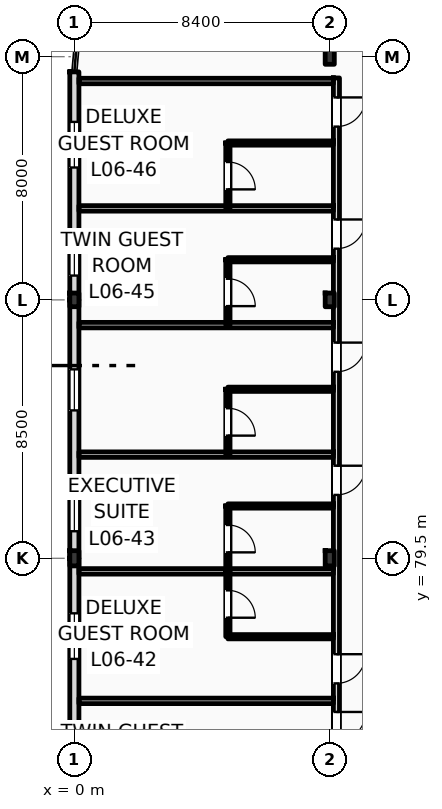
"""IFC4 building model, lengths in metres.
Left out: names, types, materials, properties, quantities, classifications, styles, units other than length and angle.
Written with IfcOpenShell. Run it as: python <this file> out.ifc"""

import sys

from ifc_helpers import new_model, si_unit, direction, frame, frame_2d, origin, origin_2d, place, context, subcontext, project, spatial, rectangle, i_section, extrude, element, fill, save


model = new_model("IFC4")
c1 = context("Model", 3, precision=1e-05, world=origin(), true_north=direction((0.0, 1.0)))
c2 = subcontext(c1, "Body", "Model", "MODEL_VIEW")
j1 = project(units=[si_unit("LENGTHUNIT", "METRE"), si_unit("PLANEANGLEUNIT", "RADIAN")], contexts=[c1])
p1 = place(None, origin())
s1 = spatial("IfcSite", under=j1, at=p1, CompositionType="ELEMENT")
p2 = place(p1, origin())
s2 = spatial("IfcBuilding", under=s1, at=p2, CompositionType="ELEMENT")
p3 = place(p2, frame((0.0, 0.0, 28.2)))
s3 = spatial("IfcBuildingStorey", under=s2, at=p3, CompositionType="ELEMENT", Elevation=28.2)
p4 = place(p3, frame((0.0, 79.5, 0.0), z_axis=(0.0, 0.0, 1.0), x_axis=(1.0, 0.0, 0.0)))
e1 = element("IfcColumn", 1, at=p4, inside=s3, PredefinedType="COLUMN", context=c2, shape_type="SweptSolid", body=[
    extrude(i_section(OverallWidth=0.3, OverallDepth=0.5, WebThickness=0.014, FlangeThickness=0.028, FilletRadius=0.027, at=origin_2d()), origin(), (0.0, 0.0, 1.0), 3.6),
])
p5 = place(p3, frame((0.0, 88.0, 0.0), z_axis=(0.0, 0.0, 1.0), x_axis=(1.0, 0.0, 0.0)))
e2 = element("IfcColumn", 2, at=p5, inside=s3, PredefinedType="COLUMN", context=c2, shape_type="SweptSolid", body=[
    extrude(i_section(OverallWidth=0.3, OverallDepth=0.45, WebThickness=0.014, FlangeThickness=0.026, FilletRadius=0.027, at=origin_2d()), origin(), (0.0, 0.0, 1.0), 3.6),
])
p6 = place(p3, frame((8.4, 79.5, 0.0), z_axis=(0.0, 0.0, 1.0), x_axis=(1.0, 0.0, 0.0)))
e3 = element("IfcColumn", 3, at=p6, inside=s3, PredefinedType="COLUMN", context=c2, shape_type="SweptSolid", body=[
    extrude(i_section(OverallWidth=0.3, OverallDepth=0.5, WebThickness=0.014, FlangeThickness=0.028, FilletRadius=0.027, at=origin_2d()), origin(), (0.0, 0.0, 1.0), 3.6),
])
p7 = place(p3, frame((8.4, 88.0, 0.0), z_axis=(0.0, 0.0, 1.0), x_axis=(1.0, 0.0, 0.0)))
e4 = element("IfcColumn", 4, at=p7, inside=s3, PredefinedType="COLUMN", context=c2, shape_type="SweptSolid", body=[
    extrude(i_section(OverallWidth=0.3, OverallDepth=0.45, WebThickness=0.014, FlangeThickness=0.026, FilletRadius=0.027, at=origin_2d()), origin(), (0.0, 0.0, 1.0), 3.6),
])
p8 = place(p3, frame((8.4, 96.0, 0.0), z_axis=(0.0, 0.0, 1.0), x_axis=(1.0, 0.0, 0.0)))
e5 = element("IfcColumn", 5, at=p8, inside=s3, PredefinedType="COLUMN", context=c2, shape_type="SweptSolid", body=[
    extrude(i_section(OverallWidth=0.3, OverallDepth=0.5, WebThickness=0.014, FlangeThickness=0.028, FilletRadius=0.027, at=origin_2d()), origin(), (0.0, 0.0, 1.0), 3.6),
])
p9 = place(p3, frame((0.0, 71.0, 0.0), z_axis=(0.0, 0.0, 1.0), x_axis=(0.0, 1.0, 0.0)))
e6 = element("IfcWall", 6, at=p9, inside=s3, PredefinedType="STANDARD", context=c2, shape_type="SweptSolid", body=[
    extrude(rectangle(XDim=8.5, YDim=0.3, at=frame_2d((4.25, 0.0))), origin(), (0.0, 0.0, 1.0), 2.99),
])
p10 = place(p9, frame((1.14, 0.0, 0.9)))
e7 = element("IfcOpeningElement", 7, at=p10, cuts=e6, PredefinedType="OPENING", context=c2, shape_type="SweptSolid", body=[
    extrude(rectangle(XDim=1.5, YDim=1.91, at=frame_2d((0.75, 0.955))), frame((0.0, 0.16, 0.0), z_axis=(0.0, -1.0, 0.0), x_axis=(1.0, 0.0, 0.0)), (0.0, 0.0, 1.0), 0.32),
])
p11 = place(p9, frame((5.19, 0.0, 0.9)))
e8 = element("IfcOpeningElement", 8, at=p11, cuts=e6, PredefinedType="OPENING", context=c2, shape_type="SweptSolid", body=[
    extrude(rectangle(XDim=1.5, YDim=1.91, at=frame_2d((0.75, 0.955))), frame((0.0, 0.16, 0.0), z_axis=(0.0, -1.0, 0.0), x_axis=(1.0, 0.0, 0.0)), (0.0, 0.0, 1.0), 0.32),
])
p12 = place(p3, frame((0.0, 79.5, 0.0), z_axis=(0.0, 0.0, 1.0), x_axis=(0.0, 1.0, 0.0)))
e9 = element("IfcWall", 9, at=p12, inside=s3, PredefinedType="STANDARD", context=c2, shape_type="SweptSolid", body=[
    extrude(rectangle(XDim=8.5, YDim=0.3, at=frame_2d((4.25, 0.0))), origin(), (0.0, 0.0, 1.0), 2.99),
])
p13 = place(p12, frame((0.89, 0.0, 0.9)))
e10 = element("IfcOpeningElement", 10, at=p13, cuts=e9, PredefinedType="OPENING", context=c2, shape_type="SweptSolid", body=[
    extrude(rectangle(XDim=1.2, YDim=1.8, at=frame_2d((0.6, 0.9))), frame((0.0, 0.16, 0.0), z_axis=(0.0, -1.0, 0.0), x_axis=(1.0, 0.0, 0.0)), (0.0, 0.0, 1.0), 0.32),
])
p14 = place(p12, frame((4.865, 0.0, 0.9)))
e11 = element("IfcOpeningElement", 11, at=p14, cuts=e9, PredefinedType="OPENING", context=c2, shape_type="SweptSolid", body=[
    extrude(rectangle(XDim=1.35, YDim=1.85, at=frame_2d((0.675, 0.925))), frame((0.0, 0.16, 0.0), z_axis=(0.0, -1.0, 0.0), x_axis=(1.0, 0.0, 0.0)), (0.0, 0.0, 1.0), 0.32),
])
p15 = place(p3, frame((0.0, 88.0, 0.0), z_axis=(0.0, 0.0, 1.0), x_axis=(0.0, 1.0, 0.0)))
e12 = element("IfcWall", 12, at=p15, inside=s3, PredefinedType="STANDARD", context=c2, shape_type="SweptSolid", body=[
    extrude(rectangle(XDim=7.5, YDim=0.3, at=frame_2d((3.75, 0.0))), origin(), (0.0, 0.0, 1.0), 3.36),
])
p16 = place(p15, frame((0.8, 0.0, 0.9)))
e13 = element("IfcOpeningElement", 13, at=p16, cuts=e12, PredefinedType="OPENING", context=c2, shape_type="SweptSolid", body=[
    extrude(rectangle(XDim=1.5, YDim=1.9, at=frame_2d((0.75, 0.95))), frame((0.0, 0.16, 0.0), z_axis=(0.0, -1.0, 0.0), x_axis=(1.0, 0.0, 0.0)), (0.0, 0.0, 1.0), 0.32),
])
p17 = place(p15, frame((4.355, 0.0, 0.9)))
e14 = element("IfcOpeningElement", 14, at=p17, cuts=e12, PredefinedType="OPENING", context=c2, shape_type="SweptSolid", body=[
    extrude(rectangle(XDim=1.5, YDim=1.95, at=frame_2d((0.75, 0.975))), frame((0.0, 0.16, 0.0), z_axis=(0.0, -1.0, 0.0), x_axis=(1.0, 0.0, 0.0)), (0.0, 0.0, 1.0), 0.32),
])
p18 = place(p3, frame((8.62, 62.64, 0.0), z_axis=(0.0, 0.0, 1.0), x_axis=(0.0, 1.0, 0.0)))
e15 = element("IfcWall", 15, at=p18, inside=s3, PredefinedType="PARTITIONING", context=c2, shape_type="SweptSolid", body=[
    extrude(rectangle(XDim=32.66, YDim=0.2, at=frame_2d((16.33, 0.0))), origin(), (0.0, 0.0, 1.0), 2.99),
])
p19 = place(p18, frame((2.71, 0.0, 0.0)))
e16 = element("IfcOpeningElement", 16, at=p19, cuts=e15, PredefinedType="OPENING", context=c2, shape_type="SweptSolid", body=[
    extrude(rectangle(XDim=0.96, YDim=2.2, at=frame_2d((0.48, 1.1))), frame((0.0, 0.11, 0.0), z_axis=(0.0, -1.0, 0.0), x_axis=(1.0, 0.0, 0.0)), (0.0, 0.0, 1.0), 0.22),
])
p20 = place(p18, frame((4.645, 0.0, 0.0)))
e17 = element("IfcOpeningElement", 17, at=p20, cuts=e15, PredefinedType="OPENING", context=c2, shape_type="SweptSolid", body=[
    extrude(rectangle(XDim=0.96, YDim=2.2, at=frame_2d((0.48, 1.1))), frame((0.0, 0.11, 0.0), z_axis=(0.0, -1.0, 0.0), x_axis=(1.0, 0.0, 0.0)), (0.0, 0.0, 1.0), 0.22),
])
p21 = place(p18, frame((10.845, 0.0, 0.0)))
e18 = element("IfcOpeningElement", 18, at=p21, cuts=e15, PredefinedType="OPENING", context=c2, shape_type="SweptSolid", body=[
    extrude(rectangle(XDim=0.96, YDim=2.2, at=frame_2d((0.48, 1.1))), frame((0.0, 0.11, 0.0), z_axis=(0.0, -1.0, 0.0), x_axis=(1.0, 0.0, 0.0)), (0.0, 0.0, 1.0), 0.22),
])
p22 = place(p18, frame((12.745, 0.0, 0.0)))
e19 = element("IfcOpeningElement", 19, at=p22, cuts=e15, PredefinedType="OPENING", context=c2, shape_type="SweptSolid", body=[
    extrude(rectangle(XDim=0.96, YDim=2.2, at=frame_2d((0.48, 1.1))), frame((0.0, 0.11, 0.0), z_axis=(0.0, -1.0, 0.0), x_axis=(1.0, 0.0, 0.0)), (0.0, 0.0, 1.0), 0.22),
])
p23 = place(p18, frame((18.945, 0.0, 0.0)))
e20 = element("IfcOpeningElement", 20, at=p23, cuts=e15, PredefinedType="OPENING", context=c2, shape_type="SweptSolid", body=[
    extrude(rectangle(XDim=0.96, YDim=2.2, at=frame_2d((0.48, 1.1))), frame((0.0, 0.11, 0.0), z_axis=(0.0, -1.0, 0.0), x_axis=(1.0, 0.0, 0.0)), (0.0, 0.0, 1.0), 0.22),
])
p24 = place(p18, frame((22.995, 0.0, 0.0)))
e21 = element("IfcOpeningElement", 21, at=p24, cuts=e15, PredefinedType="OPENING", context=c2, shape_type="SweptSolid", body=[
    extrude(rectangle(XDim=0.96, YDim=2.2, at=frame_2d((0.48, 1.1))), frame((0.0, 0.11, 0.0), z_axis=(0.0, -1.0, 0.0), x_axis=(1.0, 0.0, 0.0)), (0.0, 0.0, 1.0), 0.22),
])
p25 = place(p18, frame((27.045, 0.0, 0.0)))
e22 = element("IfcOpeningElement", 22, at=p25, cuts=e15, PredefinedType="OPENING", context=c2, shape_type="SweptSolid", body=[
    extrude(rectangle(XDim=0.96, YDim=2.2, at=frame_2d((0.48, 1.1))), frame((0.0, 0.11, 0.0), z_axis=(0.0, -1.0, 0.0), x_axis=(1.0, 0.0, 0.0)), (0.0, 0.0, 1.0), 0.22),
])
p26 = place(p18, frame((31.06, 0.0, 0.0)))
e23 = element("IfcOpeningElement", 23, at=p26, cuts=e15, PredefinedType="OPENING", context=c2, shape_type="SweptSolid", body=[
    extrude(rectangle(XDim=0.96, YDim=2.2, at=frame_2d((0.48, 1.1))), frame((0.0, 0.11, 0.0), z_axis=(0.0, -1.0, 0.0), x_axis=(1.0, 0.0, 0.0)), (0.0, 0.0, 1.0), 0.22),
])
for number, where, z_axis, x_axis in (
    (24, (0.15, 74.81, 0.0), (0.0, 0.0, 1.0), (1.0, 0.0, 0.0)),
    (25, (0.15, 79.07, 0.0), (0.0, 0.0, 1.0), (1.0, 0.0, 0.0)),
):
    element("IfcWall", number, at=place(p3, frame(where, z_axis=z_axis, x_axis=x_axis)), inside=s3, PredefinedType="PARTITIONING", context=c2, shape_type="SweptSolid", body=[
        extrude(rectangle(XDim=8.37, YDim=0.18, at=frame_2d((4.185, 0.0))), origin(), (0.0, 0.0, 1.0), 3.36),
    ])
p27 = place(p3, frame((5.05, 76.92, 0.0), z_axis=(0.0, 0.0, 1.0), x_axis=(1.0, 0.0, 0.0)))
e26 = element("IfcWall", 26, at=p27, inside=s3, PredefinedType="PARTITIONING", context=c2, shape_type="SweptSolid", body=[
    extrude(rectangle(XDim=3.47, YDim=0.14, at=frame_2d((1.735, 0.0))), origin(), (0.0, 0.0, 1.0), 3.36),
])
p28 = place(p3, frame((5.05, 76.92, 0.0), z_axis=(0.0, 0.0, 1.0), x_axis=(0.0, 1.0, 0.0)))
e27 = element("IfcWall", 27, at=p28, inside=s3, PredefinedType="PARTITIONING", context=c2, shape_type="SweptSolid", body=[
    extrude(rectangle(XDim=2.15, YDim=0.14, at=frame_2d((1.075, 0.0))), origin(), (0.0, 0.0, 1.0), 3.36),
])
p29 = place(p28, frame((0.625, 0.0, 0.0)))
e28 = element("IfcOpeningElement", 28, at=p29, cuts=e27, PredefinedType="OPENING", context=c2, shape_type="SweptSolid", body=[
    extrude(rectangle(XDim=0.9, YDim=2.1, at=frame_2d((0.45, 1.05))), frame((0.0, 0.08, 0.0), z_axis=(0.0, -1.0, 0.0), x_axis=(1.0, 0.0, 0.0)), (0.0, 0.0, 1.0), 0.16),
])
p30 = place(p3, frame((0.15, 82.91, 0.0), z_axis=(0.0, 0.0, 1.0), x_axis=(1.0, 0.0, 0.0)))
e29 = element("IfcWall", 29, at=p30, inside=s3, PredefinedType="PARTITIONING", context=c2, shape_type="SweptSolid", body=[
    extrude(rectangle(XDim=8.37, YDim=0.18, at=frame_2d((4.185, 0.0))), origin(), (0.0, 0.0, 1.0), 3.36),
])
p31 = place(p3, frame((5.05, 81.22, 0.0), z_axis=(0.0, 0.0, 1.0), x_axis=(1.0, 0.0, 0.0)))
e30 = element("IfcWall", 30, at=p31, inside=s3, PredefinedType="PARTITIONING", context=c2, shape_type="SweptSolid", body=[
    extrude(rectangle(XDim=3.47, YDim=0.14, at=frame_2d((1.735, 0.0))), origin(), (0.0, 0.0, 1.0), 3.36),
])
p32 = place(p3, frame((5.05, 79.07, 0.0), z_axis=(0.0, 0.0, 1.0), x_axis=(0.0, 1.0, 0.0)))
e31 = element("IfcWall", 31, at=p32, inside=s3, PredefinedType="PARTITIONING", context=c2, shape_type="SweptSolid", body=[
    extrude(rectangle(XDim=2.15, YDim=0.14, at=frame_2d((1.075, 0.0))), origin(), (0.0, 0.0, 1.0), 3.36),
])
p33 = place(p32, frame((0.625, 0.0, 0.0)))
e32 = element("IfcOpeningElement", 32, at=p33, cuts=e31, PredefinedType="OPENING", context=c2, shape_type="SweptSolid", body=[
    extrude(rectangle(XDim=0.9, YDim=2.1, at=frame_2d((0.45, 1.05))), frame((0.0, 0.08, 0.0), z_axis=(0.0, -1.0, 0.0), x_axis=(1.0, 0.0, 0.0)), (0.0, 0.0, 1.0), 0.16),
])
p34 = place(p3, frame((0.15, 87.17, 0.0), z_axis=(0.0, 0.0, 1.0), x_axis=(1.0, 0.0, 0.0)))
e33 = element("IfcWall", 33, at=p34, inside=s3, PredefinedType="PARTITIONING", context=c2, shape_type="SweptSolid", body=[
    extrude(rectangle(XDim=8.37, YDim=0.18, at=frame_2d((4.185, 0.0))), origin(), (0.0, 0.0, 1.0), 3.36),
])
p35 = place(p3, frame((5.05, 85.06, 0.0), z_axis=(0.0, 0.0, 1.0), x_axis=(1.0, 0.0, 0.0)))
e34 = element("IfcWall", 34, at=p35, inside=s3, PredefinedType="PARTITIONING", context=c2, shape_type="SweptSolid", body=[
    extrude(rectangle(XDim=3.47, YDim=0.14, at=frame_2d((1.735, 0.0))), origin(), (0.0, 0.0, 1.0), 3.36),
])
p36 = place(p3, frame((5.05, 82.91, 0.0), z_axis=(0.0, 0.0, 1.0), x_axis=(0.0, 1.0, 0.0)))
e35 = element("IfcWall", 35, at=p36, inside=s3, PredefinedType="PARTITIONING", context=c2, shape_type="SweptSolid", body=[
    extrude(rectangle(XDim=2.15, YDim=0.14, at=frame_2d((1.075, 0.0))), origin(), (0.0, 0.0, 1.0), 3.36),
])
p37 = place(p36, frame((0.625, 0.0, 0.0)))
e36 = element("IfcOpeningElement", 36, at=p37, cuts=e35, PredefinedType="OPENING", context=c2, shape_type="SweptSolid", body=[
    extrude(rectangle(XDim=0.9, YDim=2.1, at=frame_2d((0.45, 1.05))), frame((0.0, 0.08, 0.0), z_axis=(0.0, -1.0, 0.0), x_axis=(1.0, 0.0, 0.0)), (0.0, 0.0, 1.0), 0.16),
])
p38 = place(p3, frame((0.15, 91.01, 0.0), z_axis=(0.0, 0.0, 1.0), x_axis=(1.0, 0.0, 0.0)))
e37 = element("IfcWall", 37, at=p38, inside=s3, PredefinedType="PARTITIONING", context=c2, shape_type="SweptSolid", body=[
    extrude(rectangle(XDim=8.37, YDim=0.18, at=frame_2d((4.185, 0.0))), origin(), (0.0, 0.0, 1.0), 3.36),
])
p39 = place(p3, frame((5.05, 89.32, 0.0), z_axis=(0.0, 0.0, 1.0), x_axis=(1.0, 0.0, 0.0)))
e38 = element("IfcWall", 38, at=p39, inside=s3, PredefinedType="PARTITIONING", context=c2, shape_type="SweptSolid", body=[
    extrude(rectangle(XDim=3.47, YDim=0.14, at=frame_2d((1.735, 0.0))), origin(), (0.0, 0.0, 1.0), 3.36),
])
p40 = place(p3, frame((5.05, 87.17, 0.0), z_axis=(0.0, 0.0, 1.0), x_axis=(0.0, 1.0, 0.0)))
e39 = element("IfcWall", 39, at=p40, inside=s3, PredefinedType="PARTITIONING", context=c2, shape_type="SweptSolid", body=[
    extrude(rectangle(XDim=2.15, YDim=0.14, at=frame_2d((1.075, 0.0))), origin(), (0.0, 0.0, 1.0), 3.36),
])
p41 = place(p40, frame((0.625, 0.0, 0.0)))
e40 = element("IfcOpeningElement", 40, at=p41, cuts=e39, PredefinedType="OPENING", context=c2, shape_type="SweptSolid", body=[
    extrude(rectangle(XDim=0.9, YDim=2.1, at=frame_2d((0.45, 1.05))), frame((0.0, 0.08, 0.0), z_axis=(0.0, -1.0, 0.0), x_axis=(1.0, 0.0, 0.0)), (0.0, 0.0, 1.0), 0.16),
])
p42 = place(p3, frame((0.15, 95.2, 0.0), z_axis=(0.0, 0.0, 1.0), x_axis=(1.0, 0.0, 0.0)))
e41 = element("IfcWall", 41, at=p42, inside=s3, PredefinedType="PARTITIONING", context=c2, shape_type="SweptSolid", body=[
    extrude(rectangle(XDim=8.37, YDim=0.18, at=frame_2d((4.185, 0.0))), origin(), (0.0, 0.0, 1.0), 3.36),
])
p43 = place(p3, frame((5.05, 93.16, 0.0), z_axis=(0.0, 0.0, 1.0), x_axis=(1.0, 0.0, 0.0)))
e42 = element("IfcWall", 42, at=p43, inside=s3, PredefinedType="PARTITIONING", context=c2, shape_type="SweptSolid", body=[
    extrude(rectangle(XDim=3.47, YDim=0.14, at=frame_2d((1.735, 0.0))), origin(), (0.0, 0.0, 1.0), 3.36),
])
p44 = place(p3, frame((5.05, 91.01, 0.0), z_axis=(0.0, 0.0, 1.0), x_axis=(0.0, 1.0, 0.0)))
e43 = element("IfcWall", 43, at=p44, inside=s3, PredefinedType="PARTITIONING", context=c2, shape_type="SweptSolid", body=[
    extrude(rectangle(XDim=2.15, YDim=0.14, at=frame_2d((1.075, 0.0))), origin(), (0.0, 0.0, 1.0), 3.36),
])
p45 = place(p44, frame((0.625, 0.0, 0.0)))
e44 = element("IfcOpeningElement", 44, at=p45, cuts=e43, PredefinedType="OPENING", context=c2, shape_type="SweptSolid", body=[
    extrude(rectangle(XDim=0.9, YDim=2.1, at=frame_2d((0.45, 1.05))), frame((0.0, 0.08, 0.0), z_axis=(0.0, -1.0, 0.0), x_axis=(1.0, 0.0, 0.0)), (0.0, 0.0, 1.0), 0.16),
])
p46 = place(p11, origin())
e45 = element("IfcWindow", 45, at=p46, inside=s3, PartitioningType="DOUBLE_PANEL_VERTICAL", PredefinedType="WINDOW", context=c2, shape_type="SweptSolid", body=[
    extrude(rectangle(XDim=1.5, YDim=1.91, at=frame_2d((0.75, 0.955))), frame((0.0, 0.03, 0.0), z_axis=(0.0, -1.0, 0.0), x_axis=(1.0, 0.0, 0.0)), (0.0, 0.0, 1.0), 0.06),
])
fill(e8, e45)
p47 = place(p13, origin())
e46 = element("IfcWindow", 46, at=p47, inside=s3, PartitioningType="DOUBLE_PANEL_VERTICAL", PredefinedType="WINDOW", context=c2, shape_type="SweptSolid", body=[
    extrude(rectangle(XDim=1.2, YDim=1.8, at=frame_2d((0.6, 0.9))), frame((0.0, 0.03, 0.0), z_axis=(0.0, -1.0, 0.0), x_axis=(1.0, 0.0, 0.0)), (0.0, 0.0, 1.0), 0.06),
])
fill(e10, e46)
p48 = place(p14, origin())
e47 = element("IfcWindow", 47, at=p48, inside=s3, PartitioningType="DOUBLE_PANEL_VERTICAL", PredefinedType="WINDOW", context=c2, shape_type="SweptSolid", body=[
    extrude(rectangle(XDim=1.35, YDim=1.85, at=frame_2d((0.675, 0.925))), frame((0.0, 0.03, 0.0), z_axis=(0.0, -1.0, 0.0), x_axis=(1.0, 0.0, 0.0)), (0.0, 0.0, 1.0), 0.06),
])
fill(e11, e47)
p49 = place(p16, origin())
e48 = element("IfcWindow", 48, at=p49, inside=s3, PartitioningType="DOUBLE_PANEL_VERTICAL", PredefinedType="WINDOW", context=c2, shape_type="SweptSolid", body=[
    extrude(rectangle(XDim=1.5, YDim=1.9, at=frame_2d((0.75, 0.95))), frame((0.0, 0.03, 0.0), z_axis=(0.0, -1.0, 0.0), x_axis=(1.0, 0.0, 0.0)), (0.0, 0.0, 1.0), 0.06),
])
fill(e13, e48)
p50 = place(p17, origin())
e49 = element("IfcWindow", 49, at=p50, inside=s3, PartitioningType="DOUBLE_PANEL_VERTICAL", PredefinedType="WINDOW", context=c2, shape_type="SweptSolid", body=[
    extrude(rectangle(XDim=1.5, YDim=1.95, at=frame_2d((0.75, 0.975))), frame((0.0, 0.03, 0.0), z_axis=(0.0, -1.0, 0.0), x_axis=(1.0, 0.0, 0.0)), (0.0, 0.0, 1.0), 0.06),
])
fill(e14, e49)
p51 = place(p21, frame((0.96, 0.0, 0.0), z_axis=(0.0, 0.0, 1.0), x_axis=(-1.0, 0.0, 0.0)))
e50 = element("IfcDoor", 50, at=p51, inside=s3, OperationType="SINGLE_SWING_RIGHT", PredefinedType="DOOR", context=c2, shape_type="SweptSolid", body=[
    extrude(rectangle(XDim=0.96, YDim=2.2, at=frame_2d((0.48, 1.1))), frame((0.0, 0.025, 0.0), z_axis=(0.0, -1.0, 0.0), x_axis=(1.0, 0.0, 0.0)), (0.0, 0.0, 1.0), 0.05),
])
fill(e18, e50)
p52 = place(p22, frame((0.96, 0.0, 0.0), z_axis=(0.0, 0.0, 1.0), x_axis=(-1.0, 0.0, 0.0)))
e51 = element("IfcDoor", 51, at=p52, inside=s3, OperationType="SINGLE_SWING_RIGHT", PredefinedType="DOOR", context=c2, shape_type="SweptSolid", body=[
    extrude(rectangle(XDim=0.96, YDim=2.2, at=frame_2d((0.48, 1.1))), frame((0.0, 0.025, 0.0), z_axis=(0.0, -1.0, 0.0), x_axis=(1.0, 0.0, 0.0)), (0.0, 0.0, 1.0), 0.05),
])
fill(e19, e51)
p53 = place(p29, frame((0.9, 0.0, 0.0), z_axis=(0.0, 0.0, 1.0), x_axis=(-1.0, 0.0, 0.0)))
e52 = element("IfcDoor", 52, at=p53, inside=s3, OperationType="SINGLE_SWING_LEFT", PredefinedType="DOOR", context=c2, shape_type="SweptSolid", body=[
    extrude(rectangle(XDim=0.9, YDim=2.1, at=frame_2d((0.45, 1.05))), frame((0.0, 0.025, 0.0), z_axis=(0.0, -1.0, 0.0), x_axis=(1.0, 0.0, 0.0)), (0.0, 0.0, 1.0), 0.05),
])
fill(e28, e52)
p54 = place(p23, frame((0.96, 0.0, 0.0), z_axis=(0.0, 0.0, 1.0), x_axis=(-1.0, 0.0, 0.0)))
e53 = element("IfcDoor", 53, at=p54, inside=s3, OperationType="SINGLE_SWING_RIGHT", PredefinedType="DOOR", context=c2, shape_type="SweptSolid", body=[
    extrude(rectangle(XDim=0.96, YDim=2.2, at=frame_2d((0.48, 1.1))), frame((0.0, 0.025, 0.0), z_axis=(0.0, -1.0, 0.0), x_axis=(1.0, 0.0, 0.0)), (0.0, 0.0, 1.0), 0.05),
])
fill(e20, e53)
p55 = place(p33, frame((0.9, 0.0, 0.0), z_axis=(0.0, 0.0, 1.0), x_axis=(-1.0, 0.0, 0.0)))
e54 = element("IfcDoor", 54, at=p55, inside=s3, OperationType="SINGLE_SWING_LEFT", PredefinedType="DOOR", context=c2, shape_type="SweptSolid", body=[
    extrude(rectangle(XDim=0.9, YDim=2.1, at=frame_2d((0.45, 1.05))), frame((0.0, 0.025, 0.0), z_axis=(0.0, -1.0, 0.0), x_axis=(1.0, 0.0, 0.0)), (0.0, 0.0, 1.0), 0.05),
])
fill(e32, e54)
p56 = place(p24, frame((0.96, 0.0, 0.0), z_axis=(0.0, 0.0, 1.0), x_axis=(-1.0, 0.0, 0.0)))
e55 = element("IfcDoor", 55, at=p56, inside=s3, OperationType="SINGLE_SWING_RIGHT", PredefinedType="DOOR", context=c2, shape_type="SweptSolid", body=[
    extrude(rectangle(XDim=0.96, YDim=2.2, at=frame_2d((0.48, 1.1))), frame((0.0, 0.025, 0.0), z_axis=(0.0, -1.0, 0.0), x_axis=(1.0, 0.0, 0.0)), (0.0, 0.0, 1.0), 0.05),
])
fill(e21, e55)
p57 = place(p37, frame((0.9, 0.0, 0.0), z_axis=(0.0, 0.0, 1.0), x_axis=(-1.0, 0.0, 0.0)))
e56 = element("IfcDoor", 56, at=p57, inside=s3, OperationType="SINGLE_SWING_LEFT", PredefinedType="DOOR", context=c2, shape_type="SweptSolid", body=[
    extrude(rectangle(XDim=0.9, YDim=2.1, at=frame_2d((0.45, 1.05))), frame((0.0, 0.025, 0.0), z_axis=(0.0, -1.0, 0.0), x_axis=(1.0, 0.0, 0.0)), (0.0, 0.0, 1.0), 0.05),
])
fill(e36, e56)
p58 = place(p25, frame((0.96, 0.0, 0.0), z_axis=(0.0, 0.0, 1.0), x_axis=(-1.0, 0.0, 0.0)))
e57 = element("IfcDoor", 57, at=p58, inside=s3, OperationType="SINGLE_SWING_RIGHT", PredefinedType="DOOR", context=c2, shape_type="SweptSolid", body=[
    extrude(rectangle(XDim=0.96, YDim=2.2, at=frame_2d((0.48, 1.1))), frame((0.0, 0.025, 0.0), z_axis=(0.0, -1.0, 0.0), x_axis=(1.0, 0.0, 0.0)), (0.0, 0.0, 1.0), 0.05),
])
fill(e22, e57)
p59 = place(p41, frame((0.9, 0.0, 0.0), z_axis=(0.0, 0.0, 1.0), x_axis=(-1.0, 0.0, 0.0)))
e58 = element("IfcDoor", 58, at=p59, inside=s3, OperationType="SINGLE_SWING_LEFT", PredefinedType="DOOR", context=c2, shape_type="SweptSolid", body=[
    extrude(rectangle(XDim=0.9, YDim=2.1, at=frame_2d((0.45, 1.05))), frame((0.0, 0.025, 0.0), z_axis=(0.0, -1.0, 0.0), x_axis=(1.0, 0.0, 0.0)), (0.0, 0.0, 1.0), 0.05),
])
fill(e40, e58)
p60 = place(p26, frame((0.96, 0.0, 0.0), z_axis=(0.0, 0.0, 1.0), x_axis=(-1.0, 0.0, 0.0)))
e59 = element("IfcDoor", 59, at=p60, inside=s3, OperationType="SINGLE_SWING_RIGHT", PredefinedType="DOOR", context=c2, shape_type="SweptSolid", body=[
    extrude(rectangle(XDim=0.96, YDim=2.2, at=frame_2d((0.48, 1.1))), frame((0.0, 0.025, 0.0), z_axis=(0.0, -1.0, 0.0), x_axis=(1.0, 0.0, 0.0)), (0.0, 0.0, 1.0), 0.05),
])
fill(e23, e59)
p61 = place(p45, frame((0.9, 0.0, 0.0), z_axis=(0.0, 0.0, 1.0), x_axis=(-1.0, 0.0, 0.0)))
e60 = element("IfcDoor", 60, at=p61, inside=s3, OperationType="SINGLE_SWING_LEFT", PredefinedType="DOOR", context=c2, shape_type="SweptSolid", body=[
    extrude(rectangle(XDim=0.9, YDim=2.1, at=frame_2d((0.45, 1.05))), frame((0.0, 0.025, 0.0), z_axis=(0.0, -1.0, 0.0), x_axis=(1.0, 0.0, 0.0)), (0.0, 0.0, 1.0), 0.05),
])
fill(e44, e60)
save(model, sys.argv[1])
